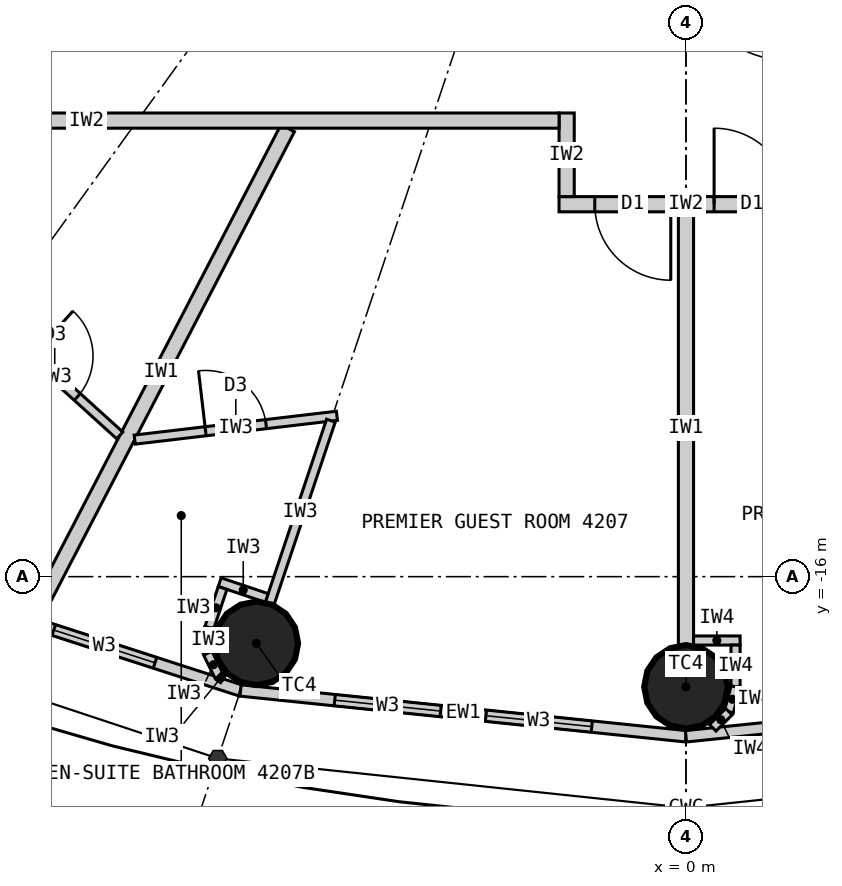
"""IFC4 building model, lengths in metres.
Left out: names, types, materials, properties, quantities, classifications, styles, units other than length and angle.
Written with IfcOpenShell. Run it as: python <this file> out.ifc"""

import sys

from ifc_helpers import new_model, si_unit, direction, frame, frame_2d, origin, origin_2d, place, context, subcontext, project, spatial, rectangle, circle, extrude, element, fill, save


model = new_model("IFC4")
c1 = context("Model", 3, precision=1e-05, world=origin(), true_north=direction((0.0, 1.0)))
c2 = subcontext(c1, "Body", "Model", "MODEL_VIEW")
j1 = project(units=[si_unit("LENGTHUNIT", "METRE"), si_unit("PLANEANGLEUNIT", "RADIAN")], contexts=[c1])
p1 = place(None, origin())
s1 = spatial("IfcSite", under=j1, at=p1, CompositionType="ELEMENT")
p2 = place(p1, origin())
s2 = spatial("IfcBuilding", under=s1, at=p2, CompositionType="ELEMENT")
p3 = place(p2, frame((0.0, 0.0, 159.9)))
s3 = spatial("IfcBuildingStorey", under=s2, at=p3, CompositionType="ELEMENT", Elevation=159.9)
for number, where, z_axis, x_axis in (
    (1, (-5.653, -16.877, 0.0), (0.0, 0.0, 1.0), (1.0, 0.0, 0.0)),
    (2, (0.0, -17.45, 0.0), (0.0, 0.0, 1.0), (1.0, 0.0, 0.0)),
):
    element("IfcColumn", number, at=place(p3, frame(where, z_axis=z_axis, x_axis=x_axis)), inside=s3, PredefinedType="COLUMN", context=c2, shape_type="SweptSolid", body=[
        extrude(circle(Radius=0.55, at=origin_2d()), origin(), (0.0, 0.0, 1.0), 3.3),
    ])
p4 = place(p3, frame((-11.346, -15.722, 0.0), z_axis=(0.0, 0.0, 1.0), x_axis=(0.951432482129, -0.307857486429, 0.0)))
e3 = element("IfcWall", 3, at=p4, inside=s3, PredefinedType="ELEMENTEDWALL", context=c2, shape_type="SweptSolid", body=[
    extrude(rectangle(XDim=5.766, YDim=0.15, at=frame_2d((2.883, 0.0))), origin(), (0.0, 0.0, 1.0), 3.12),
])
p5 = place(p4, frame((1.183, 0.0, 0.9)))
e4 = element("IfcOpeningElement", 4, at=p5, cuts=e3, PredefinedType="OPENING", context=c2, shape_type="SweptSolid", body=[
    extrude(rectangle(XDim=1.4, YDim=1.9, at=frame_2d((0.7, 0.95))), frame((0.0, 0.085, 0.0), z_axis=(0.0, -1.0, 0.0), x_axis=(1.0, 0.0, 0.0)), (0.0, 0.0, 1.0), 0.17),
])
p6 = place(p4, frame((3.183, 0.0, 0.9)))
e5 = element("IfcOpeningElement", 5, at=p6, cuts=e3, PredefinedType="OPENING", context=c2, shape_type="SweptSolid", body=[
    extrude(rectangle(XDim=1.4, YDim=1.9, at=frame_2d((0.7, 0.95))), frame((0.0, 0.085, 0.0), z_axis=(0.0, -1.0, 0.0), x_axis=(1.0, 0.0, 0.0)), (0.0, 0.0, 1.0), 0.17),
])
p7 = place(p3, frame((-5.86, -17.497, 0.0), z_axis=(0.0, 0.0, 1.0), x_axis=(0.994751738032, -0.102318032045, 0.0)))
e6 = element("IfcWall", 6, at=p7, inside=s3, PredefinedType="ELEMENTEDWALL", context=c2, shape_type="SweptSolid", body=[
    extrude(rectangle(XDim=5.891, YDim=0.15, at=frame_2d((2.946, 0.0))), origin(), (0.0, 0.0, 1.0), 3.12),
])
p8 = place(p7, frame((1.246, 0.0, 0.9)))
e7 = element("IfcOpeningElement", 7, at=p8, cuts=e6, PredefinedType="OPENING", context=c2, shape_type="SweptSolid", body=[
    extrude(rectangle(XDim=1.4, YDim=1.9, at=frame_2d((0.7, 0.95))), frame((0.0, 0.085, 0.0), z_axis=(0.0, -1.0, 0.0), x_axis=(1.0, 0.0, 0.0)), (0.0, 0.0, 1.0), 0.17),
])
p9 = place(p7, frame((3.246, 0.0, 0.9)))
e8 = element("IfcOpeningElement", 8, at=p9, cuts=e6, PredefinedType="OPENING", context=c2, shape_type="SweptSolid", body=[
    extrude(rectangle(XDim=1.4, YDim=1.9, at=frame_2d((0.7, 0.95))), frame((0.0, 0.085, 0.0), z_axis=(0.0, -1.0, 0.0), x_axis=(1.0, 0.0, 0.0)), (0.0, 0.0, 1.0), 0.17),
])
p10 = place(p3, frame((0.0, -18.1, 0.0), z_axis=(0.0, 0.0, 1.0), x_axis=(0.994751738032, 0.102318032045, 0.0)))
e9 = element("IfcWall", 9, at=p10, inside=s3, PredefinedType="ELEMENTEDWALL", context=c2, shape_type="SweptSolid", body=[
    extrude(rectangle(XDim=5.891, YDim=0.15, at=frame_2d((2.946, 0.0))), origin(), (0.0, 0.0, 1.0), 3.12),
])
p11 = place(p10, frame((1.246, 0.0, 0.9)))
e10 = element("IfcOpeningElement", 10, at=p11, cuts=e9, PredefinedType="OPENING", context=c2, shape_type="SweptSolid", body=[
    extrude(rectangle(XDim=1.4, YDim=1.9, at=frame_2d((0.7, 0.95))), frame((0.0, 0.085, 0.0), z_axis=(0.0, -1.0, 0.0), x_axis=(1.0, 0.0, 0.0)), (0.0, 0.0, 1.0), 0.17),
])
p12 = place(p10, frame((3.246, 0.0, 0.9)))
e11 = element("IfcOpeningElement", 11, at=p12, cuts=e9, PredefinedType="OPENING", context=c2, shape_type="SweptSolid", body=[
    extrude(rectangle(XDim=1.4, YDim=1.9, at=frame_2d((0.7, 0.95))), frame((0.0, 0.085, 0.0), z_axis=(0.0, -1.0, 0.0), x_axis=(1.0, 0.0, 0.0)), (0.0, 0.0, 1.0), 0.17),
])
p13 = place(p3, frame((-5.24, -10.1, 0.0), z_axis=(0.0, 0.0, 1.0), x_axis=(-0.460532965373, -0.887642601391, 0.0)))
e12 = element("IfcWall", 12, at=p13, inside=s3, PredefinedType="PARTITIONING", context=c2, shape_type="SweptSolid", body=[
    extrude(rectangle(XDim=7.231, YDim=0.2, at=frame_2d((3.616, 0.0))), origin(), (0.0, 0.0, 1.0), 3.12),
])
p14 = place(p3, frame((0.0, -11.2, 0.0), z_axis=(0.0, 0.0, 1.0), x_axis=(0.0, -1.0, 0.0)))
e13 = element("IfcWall", 13, at=p14, inside=s3, PredefinedType="PARTITIONING", context=c2, shape_type="SweptSolid", body=[
    extrude(rectangle(XDim=5.7, YDim=0.2, at=frame_2d((2.85, 0.0))), origin(), (0.0, 0.0, 1.0), 2.42),
])
p15 = place(p3, frame((1.67, -11.1, 0.0), z_axis=(0.0, 0.0, 1.0), x_axis=(-1.0, 0.0, 0.0)))
e14 = element("IfcWall", 14, at=p15, inside=s3, PredefinedType="PARTITIONING", context=c2, shape_type="SweptSolid", body=[
    extrude(rectangle(XDim=3.34, YDim=0.2, at=frame_2d((1.67, 0.0))), origin(), (0.0, 0.0, 1.0), 3.12),
])
p16 = place(p15, frame((1.87, 0.0, 0.0)))
e15 = element("IfcOpeningElement", 15, at=p16, cuts=e14, PredefinedType="OPENING", context=c2, shape_type="SweptSolid", body=[
    extrude(rectangle(XDim=1.0, YDim=2.2, at=frame_2d((0.5, 1.1))), frame((0.0, 0.11, 0.0), z_axis=(0.0, -1.0, 0.0), x_axis=(1.0, 0.0, 0.0)), (0.0, 0.0, 1.0), 0.22),
])
p17 = place(p15, frame((0.3, 0.0, 0.0)))
e16 = element("IfcOpeningElement", 16, at=p17, cuts=e14, PredefinedType="OPENING", context=c2, shape_type="SweptSolid", body=[
    extrude(rectangle(XDim=1.0, YDim=2.2, at=frame_2d((0.5, 1.1))), frame((0.0, 0.11, 0.0), z_axis=(0.0, -1.0, 0.0), x_axis=(1.0, 0.0, 0.0)), (0.0, 0.0, 1.0), 0.22),
])
p18 = place(p3, frame((-1.57, -9.9, 0.0), z_axis=(0.0, 0.0, 1.0), x_axis=(0.0, -1.0, 0.0)))
e17 = element("IfcWall", 17, at=p18, inside=s3, PredefinedType="PARTITIONING", context=c2, shape_type="SweptSolid", body=[
    extrude(rectangle(XDim=1.1, YDim=0.2, at=frame_2d((0.55, 0.0))), origin(), (0.0, 0.0, 1.0), 3.12),
])
p19 = place(p3, frame((-7.45, -14.142, 0.0), z_axis=(0.0, 0.0, 1.0), x_axis=(-0.74113984586, 0.671350675041, 0.0)))
e18 = element("IfcWall", 18, at=p19, inside=s3, PredefinedType="PARTITIONING", context=c2, shape_type="SweptSolid", body=[
    extrude(rectangle(XDim=2.309, YDim=0.12, at=frame_2d((1.154, 0.0))), origin(), (0.0, 0.0, 1.0), 3.12),
])
p20 = place(p19, frame((0.754, 0.0, 0.0)))
e19 = element("IfcOpeningElement", 19, at=p20, cuts=e18, PredefinedType="OPENING", context=c2, shape_type="SweptSolid", body=[
    extrude(rectangle(XDim=0.8, YDim=2.1, at=frame_2d((0.4, 1.05))), frame((0.0, 0.07, 0.0), z_axis=(0.0, -1.0, 0.0), x_axis=(1.0, 0.0, 0.0)), (0.0, 0.0, 1.0), 0.14),
])
p21 = place(p3, frame((-7.253, -14.197, 0.0), z_axis=(0.0, 0.0, 1.0), x_axis=(0.993128188393, 0.117031625725, 0.0)))
e20 = element("IfcWall", 20, at=p21, inside=s3, PredefinedType="PARTITIONING", context=c2, shape_type="SweptSolid", body=[
    extrude(rectangle(XDim=2.678, YDim=0.12, at=frame_2d((1.339, 0.0))), origin(), (0.0, 0.0, 1.0), 3.12),
])
p22 = place(p21, frame((0.939, 0.0, 0.0)))
e21 = element("IfcOpeningElement", 21, at=p22, cuts=e20, PredefinedType="OPENING", context=c2, shape_type="SweptSolid", body=[
    extrude(rectangle(XDim=0.8, YDim=2.1, at=frame_2d((0.4, 1.05))), frame((0.0, 0.07, 0.0), z_axis=(0.0, -1.0, 0.0), x_axis=(1.0, 0.0, 0.0)), (0.0, 0.0, 1.0), 0.14),
])
p23 = place(p3, frame((-4.671, -13.948, 0.0), z_axis=(0.0, 0.0, 1.0), x_axis=(-0.317669167093, -0.948201613729, 0.0)))
e22 = element("IfcWall", 22, at=p23, inside=s3, PredefinedType="PARTITIONING", context=c2, shape_type="SweptSolid", body=[
    extrude(rectangle(XDim=2.54, YDim=0.12, at=frame_2d((1.27, 0.0))), origin(), (0.0, 0.0, 1.0), 2.42),
])
p24 = place(p3, frame((-5.516, -16.28, 0.0), z_axis=(0.0, 0.0, 1.0), x_axis=(-0.948157944392, 0.317799484717, 0.0)))
e23 = element("IfcWall", 23, at=p24, inside=s3, PredefinedType="PARTITIONING", context=c2, shape_type="SweptSolid", body=[
    extrude(rectangle(XDim=0.652, YDim=0.12, at=frame_2d((0.326, 0.0))), origin(), (0.0, 0.0, 1.0), 3.12),
])
p25 = place(p3, frame((-6.097, -16.149, 0.0), z_axis=(0.0, 0.0, 1.0), x_axis=(-0.317292604854, -0.948327687514, 0.0)))
e24 = element("IfcWall", 24, at=p25, inside=s3, PredefinedType="PARTITIONING", context=c2, shape_type="SweptSolid", body=[
    extrude(rectangle(XDim=0.55, YDim=0.12, at=frame_2d((0.275, 0.0))), origin(), (0.0, 0.0, 1.0), 3.12),
])
for number, where, z_axis, x_axis in (
    (25, (-6.271, -16.67, 0.0), (0.0, 0.0, 1.0), (-0.061, -0.998, 0.0)),
    (26, (-6.292, -17.007, 0.0), (0.0, 0.0, 1.0), (0.445, -0.895, 0.0)),
):
    element("IfcWall", number, at=place(p3, frame(where, z_axis=z_axis, x_axis=x_axis)), inside=s3, PredefinedType="PARTITIONING", context=c2, shape_type="SweptSolid", body=[
        extrude(rectangle(XDim=0.338, YDim=0.12, at=frame_2d((0.169, 0.0))), origin(), (0.0, 0.0, 1.0), 3.12),
    ])
p26 = place(p3, frame((-6.142, -17.31, 0.0), z_axis=(0.0, 0.0, 1.0), x_axis=(0.835039693181, -0.550189704386, 0.0)))
e27 = element("IfcWall", 27, at=p26, inside=s3, PredefinedType="PARTITIONING", context=c2, shape_type="SweptSolid", body=[
    extrude(rectangle(XDim=0.062, YDim=0.12, at=frame_2d((0.031, 0.0))), origin(), (0.0, 0.0, 1.0), 3.12),
])
p27 = place(p3, frame((-1.67, -10.0, 0.0), z_axis=(0.0, 0.0, 1.0), x_axis=(-1.0, 0.0, 0.0)))
e28 = element("IfcWall", 28, at=p27, inside=s3, PredefinedType="PARTITIONING", context=c2, shape_type="SweptSolid", body=[
    extrude(rectangle(XDim=12.43, YDim=0.2, at=frame_2d((6.215, 0.0))), origin(), (0.0, 0.0, 1.0), 3.12),
])
p28 = place(p27, frame((9.655, 0.0, 0.0)))
e29 = element("IfcOpeningElement", 29, at=p28, cuts=e28, PredefinedType="OPENING", context=c2, shape_type="SweptSolid", body=[
    extrude(rectangle(XDim=1.0, YDim=2.2, at=frame_2d((0.5, 1.1))), frame((0.0, 0.11, 0.0), z_axis=(0.0, -1.0, 0.0), x_axis=(1.0, 0.0, 0.0)), (0.0, 0.0, 1.0), 0.22),
])
p29 = place(p3, frame((0.1, -16.84, 0.0), z_axis=(0.0, 0.0, 1.0), x_axis=(1.0, 0.0, 0.0)))
e30 = element("IfcWall", 30, at=p29, inside=s3, PredefinedType="PARTITIONING", context=c2, shape_type="SweptSolid", body=[
    extrude(rectangle(XDim=0.612, YDim=0.12, at=frame_2d((0.306, 0.0))), origin(), (0.0, 0.0, 1.0), 3.12),
])
p30 = place(p3, frame((0.652, -16.9, 0.0), z_axis=(0.0, 0.0, 1.0), x_axis=(0.0, -1.0, 0.0)))
e31 = element("IfcWall", 31, at=p30, inside=s3, PredefinedType="PARTITIONING", context=c2, shape_type="SweptSolid", body=[
    extrude(rectangle(XDim=0.55, YDim=0.12, at=frame_2d((0.275, 0.0))), origin(), (0.0, 0.0, 1.0), 3.12),
])
p31 = place(p3, frame((0.652, -17.45, 0.0), z_axis=(0.0, 0.0, 1.0), x_axis=(-0.258832454679, -0.965922233104, 0.0)))
e32 = element("IfcWall", 32, at=p31, inside=s3, PredefinedType="PARTITIONING", context=c2, shape_type="SweptSolid", body=[
    extrude(rectangle(XDim=0.338, YDim=0.12, at=frame_2d((0.169, 0.0))), origin(), (0.0, 0.0, 1.0), 3.12),
])
p32 = place(p3, frame((0.565, -17.776, 0.0), z_axis=(0.0, 0.0, 1.0), x_axis=(-0.707106781187, -0.707106781187, 0.0)))
e33 = element("IfcWall", 33, at=p32, inside=s3, PredefinedType="PARTITIONING", context=c2, shape_type="SweptSolid", body=[
    extrude(rectangle(XDim=0.301, YDim=0.12, at=frame_2d((0.15, 0.0))), origin(), (0.0, 0.0, 1.0), 3.12),
])
p33 = place(p6, origin())
e34 = element("IfcWindow", 34, at=p33, inside=s3, PartitioningType="SINGLE_PANEL", PredefinedType="WINDOW", context=c2, shape_type="SweptSolid", body=[
    extrude(rectangle(XDim=1.4, YDim=1.9, at=frame_2d((0.7, 0.95))), frame((0.0, 0.03, 0.0), z_axis=(0.0, -1.0, 0.0), x_axis=(1.0, 0.0, 0.0)), (0.0, 0.0, 1.0), 0.06),
])
fill(e5, e34)
p34 = place(p8, origin())
e35 = element("IfcWindow", 35, at=p34, inside=s3, PartitioningType="SINGLE_PANEL", PredefinedType="WINDOW", context=c2, shape_type="SweptSolid", body=[
    extrude(rectangle(XDim=1.4, YDim=1.9, at=frame_2d((0.7, 0.95))), frame((0.0, 0.03, 0.0), z_axis=(0.0, -1.0, 0.0), x_axis=(1.0, 0.0, 0.0)), (0.0, 0.0, 1.0), 0.06),
])
fill(e7, e35)
p35 = place(p9, origin())
e36 = element("IfcWindow", 36, at=p35, inside=s3, PartitioningType="SINGLE_PANEL", PredefinedType="WINDOW", context=c2, shape_type="SweptSolid", body=[
    extrude(rectangle(XDim=1.4, YDim=1.9, at=frame_2d((0.7, 0.95))), frame((0.0, 0.03, 0.0), z_axis=(0.0, -1.0, 0.0), x_axis=(1.0, 0.0, 0.0)), (0.0, 0.0, 1.0), 0.06),
])
fill(e8, e36)
p36 = place(p20, origin())
e37 = element("IfcDoor", 37, at=p36, inside=s3, OperationType="SINGLE_SWING_RIGHT", PredefinedType="DOOR", context=c2, shape_type="SweptSolid", body=[
    extrude(rectangle(XDim=0.8, YDim=2.1, at=frame_2d((0.4, 1.05))), frame((0.0, 0.025, 0.0), z_axis=(0.0, -1.0, 0.0), x_axis=(1.0, 0.0, 0.0)), (0.0, 0.0, 1.0), 0.05),
])
fill(e19, e37)
p37 = place(p22, origin())
e38 = element("IfcDoor", 38, at=p37, inside=s3, OperationType="SINGLE_SWING_LEFT", PredefinedType="DOOR", context=c2, shape_type="SweptSolid", body=[
    extrude(rectangle(XDim=0.8, YDim=2.1, at=frame_2d((0.4, 1.05))), frame((0.0, 0.025, 0.0), z_axis=(0.0, -1.0, 0.0), x_axis=(1.0, 0.0, 0.0)), (0.0, 0.0, 1.0), 0.05),
])
fill(e21, e38)
p38 = place(p16, origin())
e39 = element("IfcDoor", 39, at=p38, inside=s3, OperationType="SINGLE_SWING_LEFT", PredefinedType="DOOR", context=c2, shape_type="SweptSolid", body=[
    extrude(rectangle(XDim=1.0, YDim=2.2, at=frame_2d((0.5, 1.1))), frame((0.0, 0.025, 0.0), z_axis=(0.0, -1.0, 0.0), x_axis=(1.0, 0.0, 0.0)), (0.0, 0.0, 1.0), 0.05),
])
fill(e15, e39)
p39 = place(p17, origin())
e40 = element("IfcDoor", 40, at=p39, inside=s3, OperationType="SINGLE_SWING_RIGHT", PredefinedType="DOOR", context=c2, shape_type="SweptSolid", body=[
    extrude(rectangle(XDim=1.0, YDim=2.2, at=frame_2d((0.5, 1.1))), frame((0.0, 0.025, 0.0), z_axis=(0.0, -1.0, 0.0), x_axis=(1.0, 0.0, 0.0)), (0.0, 0.0, 1.0), 0.05),
])
fill(e16, e40)
save(model, sys.argv[1])
